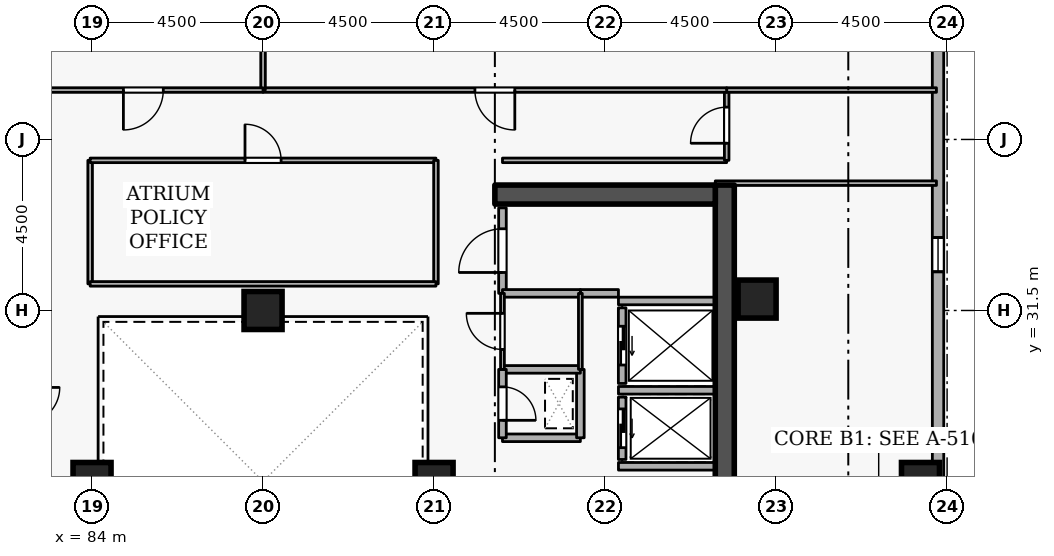
"""IFC4 building model, lengths in metres.
Left out: names, types, materials, properties, quantities, classifications, styles, units other than length and angle.
Written with IfcOpenShell. Run it as: python <this file> out.ifc"""

import sys

from ifc_helpers import new_model, si_unit, direction, frame, frame_2d, origin, origin_2d, place, context, subcontext, project, spatial, rectangle, extrude, element, fill, save


model = new_model("IFC4")
c1 = context("Model", 3, precision=1e-05, world=origin(), true_north=direction((0.0, 1.0)))
c2 = subcontext(c1, "Body", "Model", "MODEL_VIEW")
j1 = project(units=[si_unit("LENGTHUNIT", "METRE"), si_unit("PLANEANGLEUNIT", "RADIAN")], contexts=[c1])
p1 = place(None, origin())
s1 = spatial("IfcSite", under=j1, at=p1, CompositionType="ELEMENT")
p2 = place(p1, origin())
s2 = spatial("IfcBuilding", under=s1, at=p2, CompositionType="ELEMENT")
p3 = place(p2, frame((0.0, 0.0, 207.3)))
s3 = spatial("IfcBuildingStorey", under=s2, at=p3, CompositionType="ELEMENT", Elevation=207.3)
p4 = place(p3, frame((100.65, 19.2, 0.0), z_axis=(0.0, 0.0, 1.0), x_axis=(0.0, 1.0, 0.0)))
e1 = element("IfcWall", 1, at=p4, inside=s3, PredefinedType="SHEAR", context=c2, shape_type="SweptSolid", body=[
    extrude(rectangle(XDim=15.6, YDim=0.5, at=frame_2d((7.8, 0.0))), origin(), (0.0, 0.0, 1.0), 3.6),
])
p5 = place(p3, frame((94.6, 34.55, 0.0), z_axis=(0.0, 0.0, 1.0), x_axis=(1.0, 0.0, 0.0)))
e2 = element("IfcWall", 2, at=p5, inside=s3, PredefinedType="SHEAR", context=c2, shape_type="SweptSolid", body=[
    extrude(rectangle(XDim=5.8, YDim=0.5, at=frame_2d((2.9, 0.0))), origin(), (0.0, 0.0, 1.0), 3.6),
])
for number, where, z_axis, x_axis in (
    (3, (105.8, 27.0, 0.0), (0.0, 0.0, 1.0), (1.0, 0.0, 0.0)),
    (4, (101.5, 31.8, 0.0), (0.0, 0.0, 1.0), (1.0, 0.0, 0.0)),
    (5, (93.0, 27.0, 0.0), (0.0, 0.0, 1.0), (1.0, 0.0, 0.0)),
    (6, (84.0, 27.0, 0.0), (0.0, 0.0, 1.0), (1.0, 0.0, 0.0)),
    (7, (88.5, 31.5, 0.0), (0.0, 0.0, 1.0), (1.0, 0.0, 0.0)),
):
    element("IfcColumn", number, at=place(p3, frame(where, z_axis=z_axis, x_axis=x_axis)), inside=s3, PredefinedType="COLUMN", context=c2, shape_type="SweptSolid", body=[
        extrude(rectangle(XDim=1.0, YDim=1.0, at=origin_2d()), origin(), (0.0, 0.0, 1.0), 3.6),
    ])
p6 = place(p3, frame((106.265, 5.819, 0.0), z_axis=(0.0, 0.0, 1.0), x_axis=(-0.000103863011, 0.999999994606, 0.0)))
e8 = element("IfcWall", 8, at=p6, inside=s3, PredefinedType="STANDARD", context=c2, shape_type="SweptSolid", body=[
    extrude(rectangle(XDim=35.259, YDim=0.3, at=frame_2d((17.629, 0.0))), origin(), (0.0, 0.0, 1.0), 2.7),
])
p7 = place(p6, frame((2.7, 0.0, 0.72)))
e9 = element("IfcOpeningElement", 9, at=p7, cuts=e8, PredefinedType="OPENING", context=c2, shape_type="SweptSolid", body=[
    extrude(rectangle(XDim=0.9, YDim=1.75, at=frame_2d((0.45, 0.875))), frame((0.0, 0.16, 0.0), z_axis=(0.0, -1.0, 0.0), x_axis=(1.0, 0.0, 0.0)), (0.0, 0.0, 1.0), 0.32),
])
p8 = place(p6, frame((12.3, 0.0, 0.72)))
e10 = element("IfcOpeningElement", 10, at=p8, cuts=e8, PredefinedType="OPENING", context=c2, shape_type="SweptSolid", body=[
    extrude(rectangle(XDim=0.9, YDim=1.75, at=frame_2d((0.45, 0.875))), frame((0.0, 0.16, 0.0), z_axis=(0.0, -1.0, 0.0), x_axis=(1.0, 0.0, 0.0)), (0.0, 0.0, 1.0), 0.32),
])
p9 = place(p6, frame((17.1, 0.0, 0.72)))
e11 = element("IfcOpeningElement", 11, at=p9, cuts=e8, PredefinedType="OPENING", context=c2, shape_type="SweptSolid", body=[
    extrude(rectangle(XDim=0.9, YDim=1.75, at=frame_2d((0.45, 0.875))), frame((0.0, 0.16, 0.0), z_axis=(0.0, -1.0, 0.0), x_axis=(1.0, 0.0, 0.0)), (0.0, 0.0, 1.0), 0.32),
])
p10 = place(p6, frame((26.7, 0.0, 0.72)))
e12 = element("IfcOpeningElement", 12, at=p10, cuts=e8, PredefinedType="OPENING", context=c2, shape_type="SweptSolid", body=[
    extrude(rectangle(XDim=0.9, YDim=1.75, at=frame_2d((0.45, 0.875))), frame((0.0, 0.16, 0.0), z_axis=(0.0, -1.0, 0.0), x_axis=(1.0, 0.0, 0.0)), (0.0, 0.0, 1.0), 0.32),
])
p11 = place(p3, frame((97.95, 29.22, 0.0), z_axis=(0.0, 0.0, 1.0), x_axis=(0.0, -1.0, 0.0)))
e13 = element("IfcWall", 13, at=p11, inside=s3, PredefinedType="STANDARD", context=c2, shape_type="SweptSolid", body=[
    extrude(rectangle(XDim=1.64, YDim=0.2, at=frame_2d((0.82, 0.0))), origin(), (0.0, 0.0, 1.0), 3.34),
])
p12 = place(p11, frame((0.31, 0.0, 0.0)))
e14 = element("IfcOpeningElement", 14, at=p12, cuts=e13, PredefinedType="OPENING", context=c2, shape_type="SweptSolid", body=[
    extrude(rectangle(XDim=1.02, YDim=2.06, at=frame_2d((0.51, 1.03))), frame((0.0, 0.11, 0.0), z_axis=(0.0, -1.0, 0.0), x_axis=(1.0, 0.0, 0.0)), (0.0, 0.0, 1.0), 0.22),
])
p13 = place(p3, frame((97.95, 31.57, 0.0), z_axis=(0.0, 0.0, 1.0), x_axis=(0.0, -1.0, 0.0)))
e15 = element("IfcWall", 15, at=p13, inside=s3, PredefinedType="STANDARD", context=c2, shape_type="SweptSolid", body=[
    extrude(rectangle(XDim=1.99, YDim=0.2, at=frame_2d((0.995, 0.0))), origin(), (0.0, 0.0, 1.0), 3.34),
])
p14 = place(p13, frame((0.485, 0.0, 0.0)))
e16 = element("IfcOpeningElement", 16, at=p14, cuts=e15, PredefinedType="OPENING", context=c2, shape_type="SweptSolid", body=[
    extrude(rectangle(XDim=1.02, YDim=2.06, at=frame_2d((0.51, 1.03))), frame((0.0, 0.11, 0.0), z_axis=(0.0, -1.0, 0.0), x_axis=(1.0, 0.0, 0.0)), (0.0, 0.0, 1.0), 0.22),
])
for number, where, z_axis, x_axis in (
    (17, (97.852, 29.4, 0.0), (0.0, 0.0, 1.0), (1.0, 0.0, 0.0)),
    (18, (97.852, 27.4, 0.0), (0.0, 0.0, 1.0), (1.0, 0.0, 0.0)),
    (19, (97.852, 31.75, 0.0), (0.0, 0.0, 1.0), (1.0, 0.0, 0.0)),
):
    element("IfcWall", number, at=place(p3, frame(where, z_axis=z_axis, x_axis=x_axis)), inside=s3, PredefinedType="STANDARD", context=c2, shape_type="SweptSolid", body=[
        extrude(rectangle(XDim=2.536, YDim=0.2, at=frame_2d((1.268, 0.0))), origin(), (0.0, 0.0, 1.0), 3.34),
    ])
p15 = place(p3, frame((94.8, 28.15, 0.0), z_axis=(0.0, 0.0, 1.0), x_axis=(1.0, 0.0, 0.0)))
e20 = element("IfcWall", 20, at=p15, inside=s3, PredefinedType="STANDARD", context=c2, shape_type="SweptSolid", body=[
    extrude(rectangle(XDim=2.05, YDim=0.2, at=frame_2d((1.025, 0.0))), origin(), (0.0, 0.0, 1.0), 3.34),
])
p16 = place(p3, frame((96.85, 28.15, 0.0), z_axis=(0.0, 0.0, 1.0), x_axis=(0.0, 1.0, 0.0)))
e21 = element("IfcWall", 21, at=p16, inside=s3, PredefinedType="STANDARD", context=c2, shape_type="SweptSolid", body=[
    extrude(rectangle(XDim=1.8, YDim=0.2, at=frame_2d((0.9, 0.0))), origin(), (0.0, 0.0, 1.0), 3.34),
])
p17 = place(p3, frame((96.85, 29.95, 0.0), z_axis=(0.0, 0.0, 1.0), x_axis=(-1.0, 0.0, 0.0)))
e22 = element("IfcWall", 22, at=p17, inside=s3, PredefinedType="STANDARD", context=c2, shape_type="SweptSolid", body=[
    extrude(rectangle(XDim=2.05, YDim=0.2, at=frame_2d((1.025, 0.0))), origin(), (0.0, 0.0, 1.0), 3.34),
])
p18 = place(p3, frame((94.8, 29.95, 0.0), z_axis=(0.0, 0.0, 1.0), x_axis=(0.0, -1.0, 0.0)))
e23 = element("IfcWall", 23, at=p18, inside=s3, PredefinedType="STANDARD", context=c2, shape_type="SweptSolid", body=[
    extrude(rectangle(XDim=1.8, YDim=0.2, at=frame_2d((0.9, 0.0))), origin(), (0.0, 0.0, 1.0), 3.34),
])
p19 = place(p18, frame((0.46, 0.0, 0.0)))
e24 = element("IfcOpeningElement", 24, at=p19, cuts=e23, PredefinedType="OPENING", context=c2, shape_type="SweptSolid", body=[
    extrude(rectangle(XDim=0.88, YDim=2.04, at=frame_2d((0.44, 1.02))), frame((0.0, 0.11, 0.0), z_axis=(0.0, -1.0, 0.0), x_axis=(1.0, 0.0, 0.0)), (0.0, 0.0, 1.0), 0.22),
])
p20 = place(p3, frame((94.8, 31.95, 0.0), z_axis=(0.0, 0.0, 1.0), x_axis=(0.0, 1.0, 0.0)))
e25 = element("IfcWall", 25, at=p20, inside=s3, PredefinedType="STANDARD", context=c2, shape_type="SweptSolid", body=[
    extrude(rectangle(XDim=2.25, YDim=0.2, at=frame_2d((1.125, 0.0))), origin(), (0.0, 0.0, 1.0), 3.34),
])
p21 = place(p20, frame((0.55, 0.0, 0.0)))
e26 = element("IfcOpeningElement", 26, at=p21, cuts=e25, PredefinedType="OPENING", context=c2, shape_type="SweptSolid", body=[
    extrude(rectangle(XDim=1.15, YDim=2.1, at=frame_2d((0.575, 1.05))), frame((0.0, 0.11, 0.0), z_axis=(0.0, -1.0, 0.0), x_axis=(1.0, 0.0, 0.0)), (0.0, 0.0, 1.0), 0.22),
])
p22 = place(p3, frame((97.852, 31.95, 0.0), z_axis=(0.0, 0.0, 1.0), x_axis=(-1.0, 0.0, 0.0)))
e27 = element("IfcWall", 27, at=p22, inside=s3, PredefinedType="STANDARD", context=c2, shape_type="SweptSolid", body=[
    extrude(rectangle(XDim=1.002, YDim=0.2, at=frame_2d((0.501, 0.0))), origin(), (0.0, 0.0, 1.0), 3.34),
])
p23 = place(p3, frame((96.85, 31.95, 0.0), z_axis=(0.0, 0.0, 1.0), x_axis=(-1.0, 0.0, 0.0)))
e28 = element("IfcWall", 28, at=p23, inside=s3, PredefinedType="STANDARD", context=c2, shape_type="SweptSolid", body=[
    extrude(rectangle(XDim=2.05, YDim=0.2, at=frame_2d((1.025, 0.0))), origin(), (0.0, 0.0, 1.0), 3.34),
])
p24 = place(p3, frame((94.8, 29.95, 0.0), z_axis=(0.0, 0.0, 1.0), x_axis=(0.0, 1.0, 0.0)))
e29 = element("IfcWall", 29, at=p24, inside=s3, PredefinedType="PARTITIONING", context=c2, shape_type="SweptSolid", body=[
    extrude(rectangle(XDim=2.0, YDim=0.1, at=frame_2d((1.0, 0.0))), origin(), (0.0, 0.0, 1.0), 3.34),
])
p25 = place(p24, frame((0.525, 0.0, 0.0)))
e30 = element("IfcOpeningElement", 30, at=p25, cuts=e29, PredefinedType="OPENING", context=c2, shape_type="SweptSolid", body=[
    extrude(rectangle(XDim=0.95, YDim=2.1, at=frame_2d((0.475, 1.05))), frame((0.0, 0.06, 0.0), z_axis=(0.0, -1.0, 0.0), x_axis=(1.0, 0.0, 0.0)), (0.0, 0.0, 1.0), 0.12),
])
p26 = place(p3, frame((96.85, 31.95, 0.0), z_axis=(0.0, 0.0, 1.0), x_axis=(0.0, -1.0, 0.0)))
e31 = element("IfcWall", 31, at=p26, inside=s3, PredefinedType="PARTITIONING", context=c2, shape_type="SweptSolid", body=[
    extrude(rectangle(XDim=2.0, YDim=0.1, at=frame_2d((1.0, 0.0))), origin(), (0.0, 0.0, 1.0), 3.34),
])
p27 = place(p3, frame((94.8, 35.45, 0.0), z_axis=(0.0, 0.0, 1.0), x_axis=(1.0, 0.0, 0.0)))
e32 = element("IfcWall", 32, at=p27, inside=s3, PredefinedType="PARTITIONING", context=c2, shape_type="SweptSolid", body=[
    extrude(rectangle(XDim=5.9, YDim=0.12, at=frame_2d((2.95, 0.0))), origin(), (0.0, 0.0, 1.0), 3.34),
])
p28 = place(p3, frame((100.7, 35.45, 0.0), z_axis=(0.0, 0.0, 1.0), x_axis=(0.0, 1.0, 0.0)))
e33 = element("IfcWall", 33, at=p28, inside=s3, PredefinedType="PARTITIONING", context=c2, shape_type="SweptSolid", body=[
    extrude(rectangle(XDim=1.85, YDim=0.12, at=frame_2d((0.925, 0.0))), origin(), (0.0, 0.0, 1.0), 3.34),
])
p29 = place(p28, frame((0.45, 0.0, 0.0)))
e34 = element("IfcOpeningElement", 34, at=p29, cuts=e33, PredefinedType="OPENING", context=c2, shape_type="SweptSolid", body=[
    extrude(rectangle(XDim=0.95, YDim=2.1, at=frame_2d((0.475, 1.05))), frame((0.0, 0.07, 0.0), z_axis=(0.0, -1.0, 0.0), x_axis=(1.0, 0.0, 0.0)), (0.0, 0.0, 1.0), 0.14),
])
p30 = place(p3, frame((100.7, 37.3, 0.0), z_axis=(0.0, 0.0, 1.0), x_axis=(1.0, 0.0, 0.0)))
e35 = element("IfcWall", 35, at=p30, inside=s3, PredefinedType="PARTITIONING", context=c2, shape_type="SweptSolid", body=[
    extrude(rectangle(XDim=5.52, YDim=0.12, at=frame_2d((2.76, 0.0))), origin(), (0.0, 0.0, 1.0), 3.34),
])
p31 = place(p3, frame((106.22, 34.85, 0.0), z_axis=(0.0, 0.0, 1.0), x_axis=(-1.0, 0.0, 0.0)))
e36 = element("IfcWall", 36, at=p31, inside=s3, PredefinedType="PARTITIONING", context=c2, shape_type="SweptSolid", body=[
    extrude(rectangle(XDim=5.82, YDim=0.12, at=frame_2d((2.91, 0.0))), origin(), (0.0, 0.0, 1.0), 2.545),
])
p32 = place(p3, frame((100.7, 37.3, 0.0), z_axis=(0.0, 0.0, 1.0), x_axis=(-1.0, 0.0, 0.0)))
e37 = element("IfcWall", 37, at=p32, inside=s3, PredefinedType="PARTITIONING", context=c2, shape_type="SweptSolid", body=[
    extrude(rectangle(XDim=12.2, YDim=0.12, at=frame_2d((6.1, 0.0))), origin(), (0.0, 0.0, 1.0), 3.34),
])
p33 = place(p32, frame((5.575, 0.0, 0.0)))
e38 = element("IfcOpeningElement", 38, at=p33, cuts=e37, PredefinedType="OPENING", context=c2, shape_type="SweptSolid", body=[
    extrude(rectangle(XDim=1.05, YDim=2.1, at=frame_2d((0.525, 1.05))), frame((0.0, 0.07, 0.0), z_axis=(0.0, -1.0, 0.0), x_axis=(1.0, 0.0, 0.0)), (0.0, 0.0, 1.0), 0.14),
])
p34 = place(p3, frame((88.5, 37.3, 0.0), z_axis=(0.0, 0.0, 1.0), x_axis=(0.0, 1.0, 0.0)))
e39 = element("IfcWall", 39, at=p34, inside=s3, PredefinedType="PARTITIONING", context=c2, shape_type="SweptSolid", body=[
    extrude(rectangle(XDim=7.42, YDim=0.12, at=frame_2d((3.71, 0.0))), origin(), (0.0, 0.0, 1.0), 2.932),
])
p35 = place(p3, frame((88.5, 37.3, 0.0), z_axis=(0.0, 0.0, 1.0), x_axis=(-1.0, 0.0, 0.0)))
e40 = element("IfcWall", 40, at=p35, inside=s3, PredefinedType="PARTITIONING", context=c2, shape_type="SweptSolid", body=[
    extrude(rectangle(XDim=6.3, YDim=0.12, at=frame_2d((3.15, 0.0))), origin(), (0.0, 0.0, 1.0), 3.34),
])
p36 = place(p35, frame((2.625, 0.0, 0.0)))
e41 = element("IfcOpeningElement", 41, at=p36, cuts=e40, PredefinedType="OPENING", context=c2, shape_type="SweptSolid", body=[
    extrude(rectangle(XDim=1.05, YDim=2.1, at=frame_2d((0.525, 1.05))), frame((0.0, 0.07, 0.0), z_axis=(0.0, -1.0, 0.0), x_axis=(1.0, 0.0, 0.0)), (0.0, 0.0, 1.0), 0.14),
])
p37 = place(p3, frame((83.95, 32.2, 0.0), z_axis=(0.0, 0.0, 1.0), x_axis=(0.0, 1.0, 0.0)))
e42 = element("IfcWall", 42, at=p37, inside=s3, PredefinedType="PARTITIONING", context=c2, shape_type="SweptSolid", body=[
    extrude(rectangle(XDim=3.25, YDim=0.12, at=frame_2d((1.625, 0.0))), origin(), (0.0, 0.0, 1.0), 3.34),
])
p38 = place(p3, frame((83.95, 35.45, 0.0), z_axis=(0.0, 0.0, 1.0), x_axis=(1.0, 0.0, 0.0)))
e43 = element("IfcWall", 43, at=p38, inside=s3, PredefinedType="PARTITIONING", context=c2, shape_type="SweptSolid", body=[
    extrude(rectangle(XDim=9.1, YDim=0.12, at=frame_2d((4.55, 0.0))), origin(), (0.0, 0.0, 1.0), 3.34),
])
p39 = place(p38, frame((4.075, 0.0, 0.0)))
e44 = element("IfcOpeningElement", 44, at=p39, cuts=e43, PredefinedType="OPENING", context=c2, shape_type="SweptSolid", body=[
    extrude(rectangle(XDim=0.95, YDim=2.1, at=frame_2d((0.475, 1.05))), frame((0.0, 0.07, 0.0), z_axis=(0.0, -1.0, 0.0), x_axis=(1.0, 0.0, 0.0)), (0.0, 0.0, 1.0), 0.14),
])
p40 = place(p3, frame((93.05, 35.45, 0.0), z_axis=(0.0, 0.0, 1.0), x_axis=(0.0, -1.0, 0.0)))
e45 = element("IfcWall", 45, at=p40, inside=s3, PredefinedType="PARTITIONING", context=c2, shape_type="SweptSolid", body=[
    extrude(rectangle(XDim=3.25, YDim=0.12, at=frame_2d((1.625, 0.0))), origin(), (0.0, 0.0, 1.0), 3.34),
])
p41 = place(p3, frame((93.05, 32.2, 0.0), z_axis=(0.0, 0.0, 1.0), x_axis=(-1.0, 0.0, 0.0)))
e46 = element("IfcWall", 46, at=p41, inside=s3, PredefinedType="PARTITIONING", context=c2, shape_type="SweptSolid", body=[
    extrude(rectangle(XDim=9.1, YDim=0.12, at=frame_2d((4.55, 0.0))), origin(), (0.0, 0.0, 1.0), 3.34),
])
p42 = place(p10, origin())
e47 = element("IfcWindow", 47, at=p42, inside=s3, PartitioningType="SINGLE_PANEL", PredefinedType="WINDOW", context=c2, shape_type="SweptSolid", body=[
    extrude(rectangle(XDim=0.9, YDim=1.75, at=frame_2d((0.45, 0.875))), frame((0.0, 0.03, 0.0), z_axis=(0.0, -1.0, 0.0), x_axis=(1.0, 0.0, 0.0)), (0.0, 0.0, 1.0), 0.06),
])
fill(e12, e47)
p43 = place(p12, origin())
e48 = element("IfcDoor", 48, at=p43, inside=s3, OperationType="SLIDING_TO_LEFT", PredefinedType="DOOR", context=c2, shape_type="SweptSolid", body=[
    extrude(rectangle(XDim=1.02, YDim=2.06, at=frame_2d((0.51, 1.03))), frame((0.0, 0.025, 0.0), z_axis=(0.0, -1.0, 0.0), x_axis=(1.0, 0.0, 0.0)), (0.0, 0.0, 1.0), 0.05),
])
fill(e14, e48)
p44 = place(p14, origin())
e49 = element("IfcDoor", 49, at=p44, inside=s3, OperationType="SLIDING_TO_LEFT", PredefinedType="DOOR", context=c2, shape_type="SweptSolid", body=[
    extrude(rectangle(XDim=1.02, YDim=2.06, at=frame_2d((0.51, 1.03))), frame((0.0, 0.025, 0.0), z_axis=(0.0, -1.0, 0.0), x_axis=(1.0, 0.0, 0.0)), (0.0, 0.0, 1.0), 0.05),
])
fill(e16, e49)
p45 = place(p19, origin())
e50 = element("IfcDoor", 50, at=p45, inside=s3, OperationType="SINGLE_SWING_RIGHT", PredefinedType="DOOR", context=c2, shape_type="SweptSolid", body=[
    extrude(rectangle(XDim=0.88, YDim=2.04, at=frame_2d((0.44, 1.02))), frame((0.0, 0.025, 0.0), z_axis=(0.0, -1.0, 0.0), x_axis=(1.0, 0.0, 0.0)), (0.0, 0.0, 1.0), 0.05),
])
fill(e24, e50)
p46 = place(p25, origin())
e51 = element("IfcDoor", 51, at=p46, inside=s3, OperationType="SINGLE_SWING_RIGHT", PredefinedType="DOOR", context=c2, shape_type="SweptSolid", body=[
    extrude(rectangle(XDim=0.95, YDim=2.1, at=frame_2d((0.475, 1.05))), frame((0.0, 0.025, 0.0), z_axis=(0.0, -1.0, 0.0), x_axis=(1.0, 0.0, 0.0)), (0.0, 0.0, 1.0), 0.05),
])
fill(e30, e51)
p47 = place(p21, origin())
e52 = element("IfcDoor", 52, at=p47, inside=s3, OperationType="SINGLE_SWING_LEFT", PredefinedType="DOOR", context=c2, shape_type="SweptSolid", body=[
    extrude(rectangle(XDim=1.15, YDim=2.1, at=frame_2d((0.575, 1.05))), frame((0.0, 0.025, 0.0), z_axis=(0.0, -1.0, 0.0), x_axis=(1.0, 0.0, 0.0)), (0.0, 0.0, 1.0), 0.05),
])
fill(e26, e52)
p48 = place(p29, origin())
e53 = element("IfcDoor", 53, at=p48, inside=s3, OperationType="SINGLE_SWING_LEFT", PredefinedType="DOOR", context=c2, shape_type="SweptSolid", body=[
    extrude(rectangle(XDim=0.95, YDim=2.1, at=frame_2d((0.475, 1.05))), frame((0.0, 0.025, 0.0), z_axis=(0.0, -1.0, 0.0), x_axis=(1.0, 0.0, 0.0)), (0.0, 0.0, 1.0), 0.05),
])
fill(e34, e53)
p49 = place(p33, origin())
e54 = element("IfcDoor", 54, at=p49, inside=s3, OperationType="SINGLE_SWING_LEFT", PredefinedType="DOOR", context=c2, shape_type="SweptSolid", body=[
    extrude(rectangle(XDim=1.05, YDim=2.1, at=frame_2d((0.525, 1.05))), frame((0.0, 0.025, 0.0), z_axis=(0.0, -1.0, 0.0), x_axis=(1.0, 0.0, 0.0)), (0.0, 0.0, 1.0), 0.05),
])
fill(e38, e54)
p50 = place(p36, origin())
e55 = element("IfcDoor", 55, at=p50, inside=s3, OperationType="SINGLE_SWING_RIGHT", PredefinedType="DOOR", context=c2, shape_type="SweptSolid", body=[
    extrude(rectangle(XDim=1.05, YDim=2.1, at=frame_2d((0.525, 1.05))), frame((0.0, 0.025, 0.0), z_axis=(0.0, -1.0, 0.0), x_axis=(1.0, 0.0, 0.0)), (0.0, 0.0, 1.0), 0.05),
])
fill(e41, e55)
p51 = place(p39, origin())
e56 = element("IfcDoor", 56, at=p51, inside=s3, OperationType="SINGLE_SWING_LEFT", PredefinedType="DOOR", context=c2, shape_type="SweptSolid", body=[
    extrude(rectangle(XDim=0.95, YDim=2.1, at=frame_2d((0.475, 1.05))), frame((0.0, 0.025, 0.0), z_axis=(0.0, -1.0, 0.0), x_axis=(1.0, 0.0, 0.0)), (0.0, 0.0, 1.0), 0.05),
])
fill(e44, e56)
save(model, sys.argv[1])
